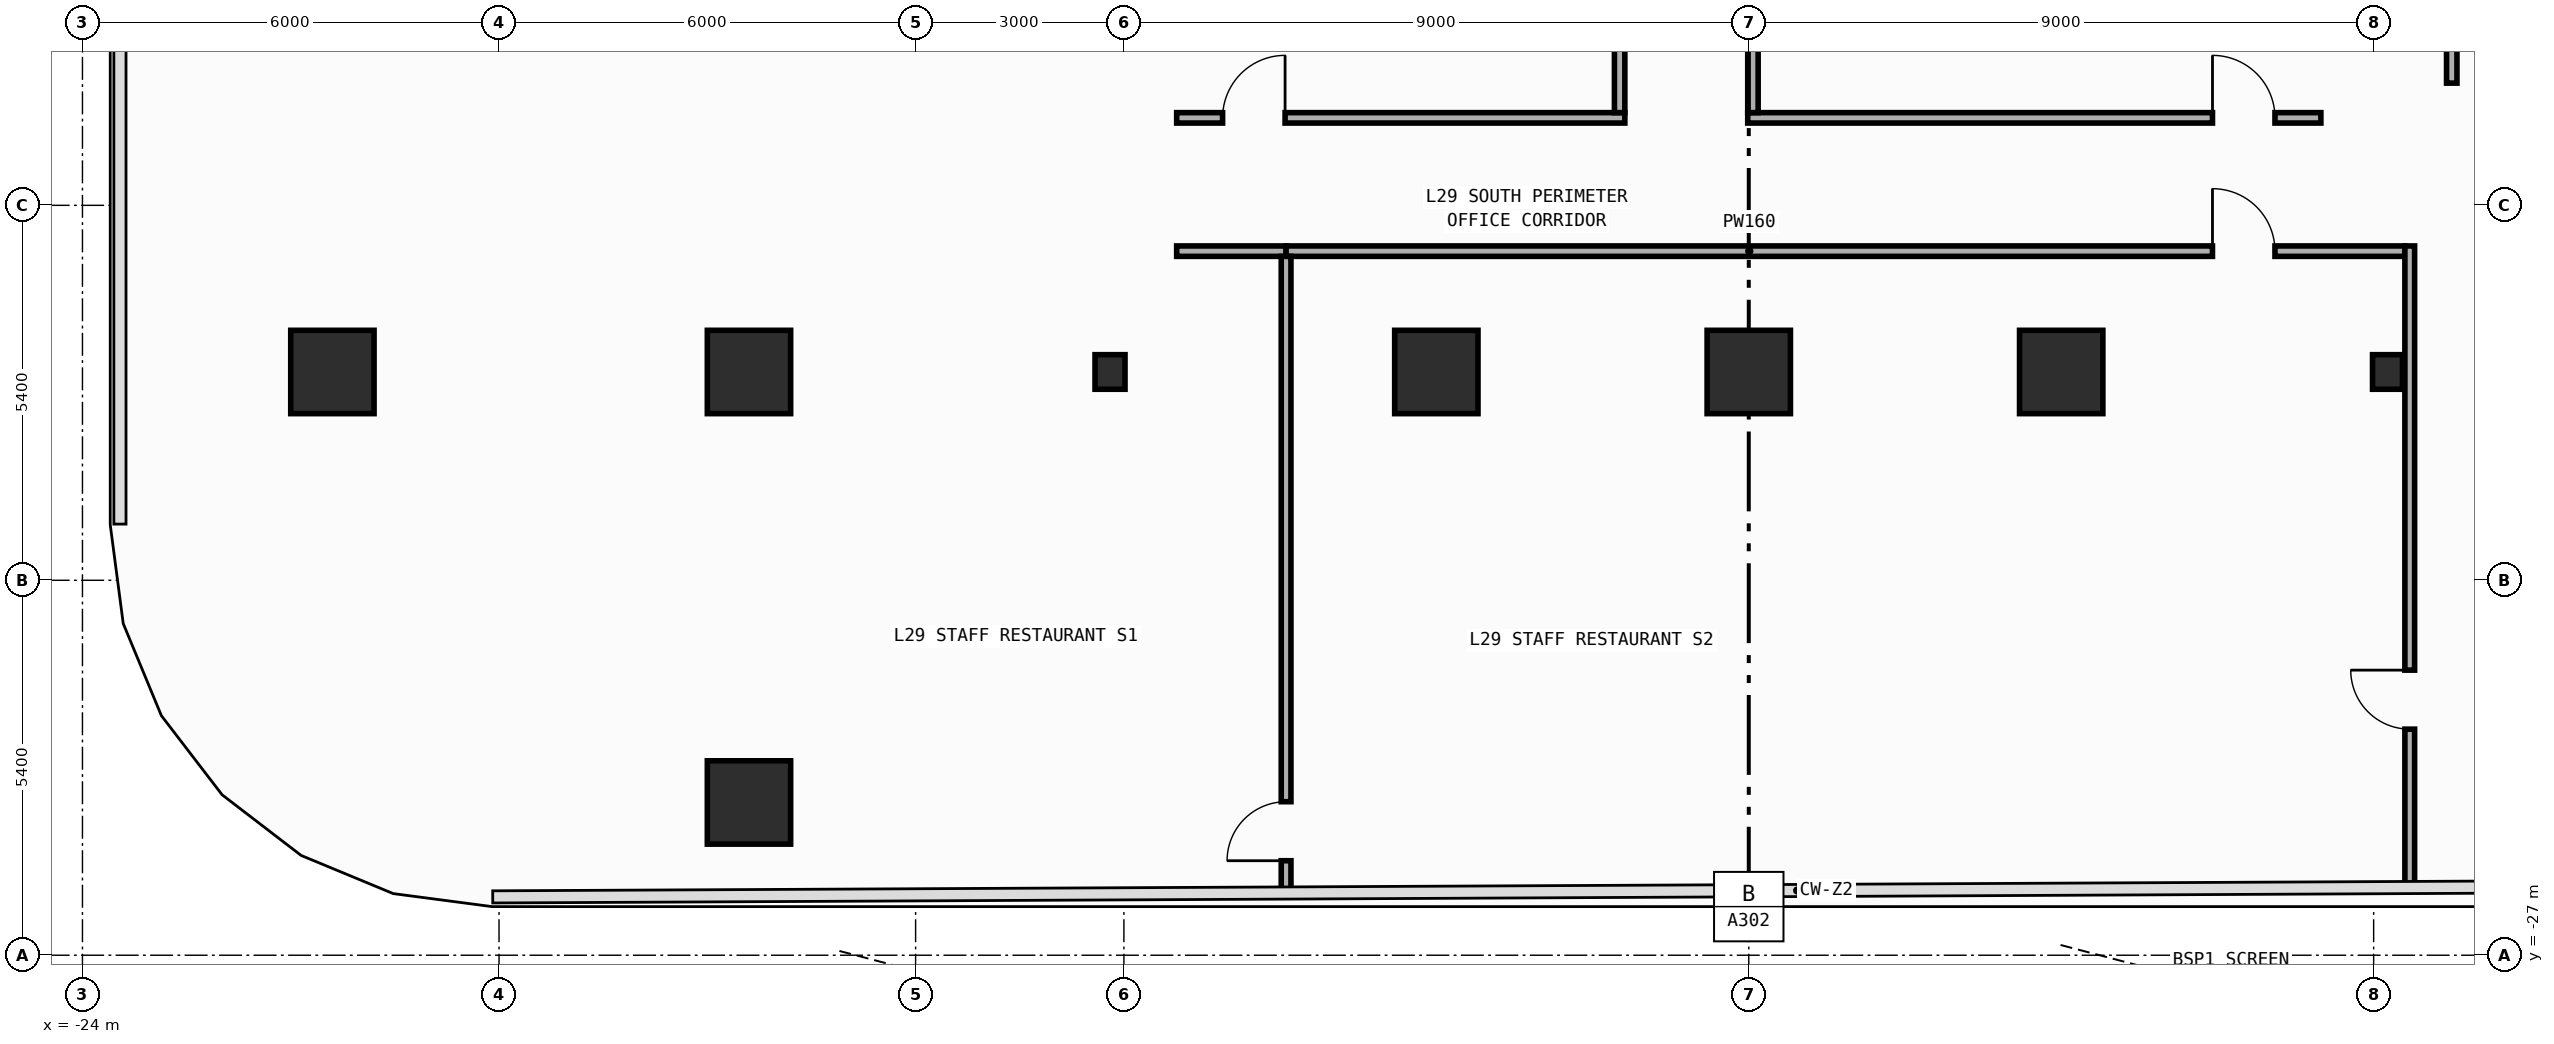
"""IFC4 building model, lengths in metres.
Left out: names, types, materials, properties, quantities, classifications, styles, units other than length and angle.
Written with IfcOpenShell. Run it as: python <this file> out.ifc"""

import sys

from ifc_helpers import new_model, si_unit, direction, frame, frame_2d, origin, origin_2d, place, context, subcontext, project, spatial, rectangle, i_section, extrude, element, fill, save


model = new_model("IFC4")
c1 = context("Model", 3, precision=1e-05, world=origin(), true_north=direction((0.0, 1.0)))
c2 = subcontext(c1, "Body", "Model", "MODEL_VIEW")
j1 = project(units=[si_unit("LENGTHUNIT", "METRE"), si_unit("PLANEANGLEUNIT", "RADIAN")], contexts=[c1])
p1 = place(None, origin())
s1 = spatial("IfcSite", under=j1, at=p1, CompositionType="ELEMENT")
p2 = place(p1, origin())
s2 = spatial("IfcBuilding", under=s1, at=p2, CompositionType="ELEMENT")
p3 = place(p2, frame((0.0, 0.0, 126.8)))
s3 = spatial("IfcBuildingStorey", under=s2, at=p3, CompositionType="ELEMENT", Elevation=126.8)
for number, where, z_axis, x_axis in (
    (1, (-9.2, -18.6, 0.0), (0.0, 0.0, 1.0), (1.0, 0.0, 0.0)),
    (2, (9.2, -18.6, 0.0), (0.0, 0.0, 1.0), (1.0, 0.0, 0.0)),
):
    element("IfcColumn", number, at=place(p3, frame(where, z_axis=z_axis, x_axis=x_axis)), inside=s3, PredefinedType="COLUMN", context=c2, shape_type="SweptSolid", body=[
        extrude(i_section(OverallWidth=0.432, OverallDepth=0.498, WebThickness=0.045, FlangeThickness=0.07, FilletRadius=0.022, at=origin_2d()), origin(), (0.0, 0.0, 1.0), 4.2),
    ])
for number, where, z_axis, x_axis in (
    (3, (-20.4, -18.6, 0.0), (0.0, 0.0, 1.0), (1.0, 0.0, 0.0)),
    (4, (-14.4, -18.6, 0.0), (0.0, 0.0, 1.0), (1.0, 0.0, 0.0)),
    (5, (-4.5, -18.6, 0.0), (0.0, 0.0, 1.0), (1.0, 0.0, 0.0)),
    (6, (0.0, -18.6, 0.0), (0.0, 0.0, 1.0), (1.0, 0.0, 0.0)),
    (7, (4.5, -18.6, 0.0), (0.0, 0.0, 1.0), (1.0, 0.0, 0.0)),
    (8, (-14.4, -24.8, 0.0), (0.0, 0.0, 1.0), (1.0, 0.0, 0.0)),
):
    element("IfcColumn", number, at=place(p3, frame(where, z_axis=z_axis, x_axis=x_axis)), inside=s3, PredefinedType="COLUMN", context=c2, shape_type="SweptSolid", body=[
        extrude(rectangle(XDim=1.2, YDim=1.2, at=origin_2d()), origin(), (0.0, 0.0, 1.0), 4.2),
    ])
p4 = place(p3, frame((10.125, -14.44, 0.0), z_axis=(0.0, 0.0, 1.0), x_axis=(0.0, 1.0, 0.0)))
e9 = element("IfcWall", 9, at=p4, inside=s3, PredefinedType="PARTITIONING", context=c2, shape_type="SweptSolid", body=[
    extrude(rectangle(XDim=8.8, YDim=0.15, at=frame_2d((4.4, 0.0))), origin(), (0.0, 0.0, 1.0), 3.94),
])
p5 = place(p4, frame((7.44, 0.0, 0.0)))
e10 = element("IfcOpeningElement", 10, at=p5, cuts=e9, PredefinedType="OPENING", context=c2, shape_type="SweptSolid", body=[
    extrude(rectangle(XDim=0.9, YDim=2.15, at=frame_2d((0.45, 1.075))), frame((0.0, 0.085, 0.0), z_axis=(0.0, -1.0, 0.0), x_axis=(1.0, 0.0, 0.0)), (0.0, 0.0, 1.0), 0.17),
])
p6 = place(p3, frame((-8.24, -16.86, 0.0), z_axis=(0.0, 0.0, 1.0), x_axis=(1.0, 0.0, 0.0)))
e11 = element("IfcWall", 11, at=p6, inside=s3, PredefinedType="PARTITIONING", context=c2, shape_type="SweptSolid", body=[
    extrude(rectangle(XDim=1.576, YDim=0.15, at=frame_2d((0.788, 0.0))), origin(), (0.0, 0.0, 1.0), 3.94),
])
p7 = place(p3, frame((-6.664, -16.86, 0.0), z_axis=(0.0, 0.0, 1.0), x_axis=(1.0, 0.0, 0.0)))
e12 = element("IfcWall", 12, at=p7, inside=s3, PredefinedType="PARTITIONING", context=c2, shape_type="SweptSolid", body=[
    extrude(rectangle(XDim=16.114, YDim=0.15, at=frame_2d((8.057, 0.0))), origin(), (0.0, 0.0, 1.0), 3.94),
])
p8 = place(p7, frame((13.343, 0.0, 0.0)))
e13 = element("IfcOpeningElement", 13, at=p8, cuts=e12, PredefinedType="OPENING", context=c2, shape_type="SweptSolid", body=[
    extrude(rectangle(XDim=0.9, YDim=2.15, at=frame_2d((0.45, 1.075))), frame((0.0, 0.085, 0.0), z_axis=(0.0, -1.0, 0.0), x_axis=(1.0, 0.0, 0.0)), (0.0, 0.0, 1.0), 0.17),
])
p9 = place(p3, frame((-8.24, -14.94, 0.0), z_axis=(0.0, 0.0, 1.0), x_axis=(1.0, 0.0, 0.0)))
e14 = element("IfcWall", 14, at=p9, inside=s3, PredefinedType="PARTITIONING", context=c2, shape_type="SweptSolid", body=[
    extrude(rectangle(XDim=6.455, YDim=0.15, at=frame_2d((3.228, 0.0))), origin(), (0.0, 0.0, 1.0), 3.94),
])
p10 = place(p9, frame((0.662, 0.0, 0.0)))
e15 = element("IfcOpeningElement", 15, at=p10, cuts=e14, PredefinedType="OPENING", context=c2, shape_type="SweptSolid", body=[
    extrude(rectangle(XDim=0.9, YDim=2.15, at=frame_2d((0.45, 1.075))), frame((0.0, 0.085, 0.0), z_axis=(0.0, -1.0, 0.0), x_axis=(1.0, 0.0, 0.0)), (0.0, 0.0, 1.0), 0.17),
])
p11 = place(p3, frame((-0.015, -14.94, 0.0), z_axis=(0.0, 0.0, 1.0), x_axis=(1.0, 0.0, 0.0)))
e16 = element("IfcWall", 16, at=p11, inside=s3, PredefinedType="PARTITIONING", context=c2, shape_type="SweptSolid", body=[
    extrude(rectangle(XDim=8.255, YDim=0.15, at=frame_2d((4.127, 0.0))), origin(), (0.0, 0.0, 1.0), 3.94),
])
p12 = place(p11, frame((6.694, 0.0, 0.0)))
e17 = element("IfcOpeningElement", 17, at=p12, cuts=e16, PredefinedType="OPENING", context=c2, shape_type="SweptSolid", body=[
    extrude(rectangle(XDim=0.9, YDim=2.15, at=frame_2d((0.45, 1.075))), frame((0.0, 0.085, 0.0), z_axis=(0.0, -1.0, 0.0), x_axis=(1.0, 0.0, 0.0)), (0.0, 0.0, 1.0), 0.17),
])
p13 = place(p3, frame((-1.86, -14.865, 0.0), z_axis=(0.0, 0.0, 1.0), x_axis=(0.0, 1.0, 0.0)))
e18 = element("IfcWall", 18, at=p13, inside=s3, PredefinedType="PARTITIONING", context=c2, shape_type="SweptSolid", body=[
    extrude(rectangle(XDim=9.075, YDim=0.15, at=frame_2d((4.538, 0.0))), origin(), (0.0, 0.0, 1.0), 3.94),
])
p14 = place(p13, frame((7.715, 0.0, 0.0)))
e19 = element("IfcOpeningElement", 19, at=p14, cuts=e18, PredefinedType="OPENING", context=c2, shape_type="SweptSolid", body=[
    extrude(rectangle(XDim=0.9, YDim=2.15, at=frame_2d((0.45, 1.075))), frame((0.0, 0.085, 0.0), z_axis=(0.0, -1.0, 0.0), x_axis=(1.0, 0.0, 0.0)), (0.0, 0.0, 1.0), 0.17),
])
p15 = place(p3, frame((0.06, -14.865, 0.0), z_axis=(0.0, 0.0, 1.0), x_axis=(0.0, 1.0, 0.0)))
e20 = element("IfcWall", 20, at=p15, inside=s3, PredefinedType="PARTITIONING", context=c2, shape_type="SweptSolid", body=[
    extrude(rectangle(XDim=9.075, YDim=0.15, at=frame_2d((4.538, 0.0))), origin(), (0.0, 0.0, 1.0), 3.94),
])
p16 = place(p15, frame((7.715, 0.0, 0.0)))
e21 = element("IfcOpeningElement", 21, at=p16, cuts=e20, PredefinedType="OPENING", context=c2, shape_type="SweptSolid", body=[
    extrude(rectangle(XDim=0.9, YDim=2.15, at=frame_2d((0.45, 1.075))), frame((0.0, 0.085, 0.0), z_axis=(0.0, -1.0, 0.0), x_axis=(1.0, 0.0, 0.0)), (0.0, 0.0, 1.0), 0.17),
])
p17 = place(p3, frame((-6.664, -26.099, 0.0), z_axis=(0.0, 0.0, 1.0), x_axis=(0.0, 1.0, 0.0)))
e22 = element("IfcWall", 22, at=p17, inside=s3, PredefinedType="PARTITIONING", context=c2, shape_type="SweptSolid", body=[
    extrude(rectangle(XDim=9.164, YDim=0.14, at=frame_2d((4.582, 0.0))), origin(), (0.0, 0.0, 1.0), 3.94),
])
p18 = place(p17, frame((0.46, 0.0, 0.0)))
e23 = element("IfcOpeningElement", 23, at=p18, cuts=e22, PredefinedType="OPENING", context=c2, shape_type="SweptSolid", body=[
    extrude(rectangle(XDim=0.85, YDim=2.1, at=frame_2d((0.425, 1.05))), frame((0.0, 0.08, 0.0), z_axis=(0.0, -1.0, 0.0), x_axis=(1.0, 0.0, 0.0)), (0.0, 0.0, 1.0), 0.16),
])
p19 = place(p3, frame((9.52, -26.02, 0.0), z_axis=(0.0, 0.0, 1.0), x_axis=(0.0, 1.0, 0.0)))
e24 = element("IfcWall", 24, at=p19, inside=s3, PredefinedType="PARTITIONING", context=c2, shape_type="SweptSolid", body=[
    extrude(rectangle(XDim=9.235, YDim=0.14, at=frame_2d((4.618, 0.0))), origin(), (0.0, 0.0, 1.0), 3.24),
])
p20 = place(p19, frame((2.276, 0.0, 0.0)))
e25 = element("IfcOpeningElement", 25, at=p20, cuts=e24, PredefinedType="OPENING", context=c2, shape_type="SweptSolid", body=[
    extrude(rectangle(XDim=0.85, YDim=2.1, at=frame_2d((0.425, 1.05))), frame((0.0, 0.08, 0.0), z_axis=(0.0, -1.0, 0.0), x_axis=(1.0, 0.0, 0.0)), (0.0, 0.0, 1.0), 0.16),
])
p21 = place(p8, origin())
e26 = element("IfcDoor", 26, at=p21, inside=s3, OperationType="SINGLE_SWING_LEFT", PredefinedType="DOOR", context=c2, shape_type="SweptSolid", body=[
    extrude(rectangle(XDim=0.9, YDim=2.15, at=frame_2d((0.45, 1.075))), frame((0.0, 0.025, 0.0), z_axis=(0.0, -1.0, 0.0), x_axis=(1.0, 0.0, 0.0)), (0.0, 0.0, 1.0), 0.05),
])
fill(e13, e26)
p22 = place(p10, origin())
e27 = element("IfcDoor", 27, at=p22, inside=s3, OperationType="SINGLE_SWING_RIGHT", PredefinedType="DOOR", context=c2, shape_type="SweptSolid", body=[
    extrude(rectangle(XDim=0.9, YDim=2.15, at=frame_2d((0.45, 1.075))), frame((0.0, 0.025, 0.0), z_axis=(0.0, -1.0, 0.0), x_axis=(1.0, 0.0, 0.0)), (0.0, 0.0, 1.0), 0.05),
])
fill(e15, e27)
p23 = place(p12, origin())
e28 = element("IfcDoor", 28, at=p23, inside=s3, OperationType="SINGLE_SWING_LEFT", PredefinedType="DOOR", context=c2, shape_type="SweptSolid", body=[
    extrude(rectangle(XDim=0.9, YDim=2.15, at=frame_2d((0.45, 1.075))), frame((0.0, 0.025, 0.0), z_axis=(0.0, -1.0, 0.0), x_axis=(1.0, 0.0, 0.0)), (0.0, 0.0, 1.0), 0.05),
])
fill(e17, e28)
p24 = place(p20, origin())
e29 = element("IfcDoor", 29, at=p24, inside=s3, OperationType="SINGLE_SWING_RIGHT", PredefinedType="DOOR", context=c2, shape_type="SweptSolid", body=[
    extrude(rectangle(XDim=0.85, YDim=2.1, at=frame_2d((0.425, 1.05))), frame((0.0, 0.025, 0.0), z_axis=(0.0, -1.0, 0.0), x_axis=(1.0, 0.0, 0.0)), (0.0, 0.0, 1.0), 0.05),
])
fill(e25, e29)
p25 = place(p18, origin())
e30 = element("IfcDoor", 30, at=p25, inside=s3, OperationType="SINGLE_SWING_LEFT", PredefinedType="DOOR", context=c2, shape_type="SweptSolid", body=[
    extrude(rectangle(XDim=0.85, YDim=2.1, at=frame_2d((0.425, 1.05))), frame((0.0, 0.025, 0.0), z_axis=(0.0, -1.0, 0.0), x_axis=(1.0, 0.0, 0.0)), (0.0, 0.0, 1.0), 0.05),
])
fill(e23, e30)
save(model, sys.argv[1])
